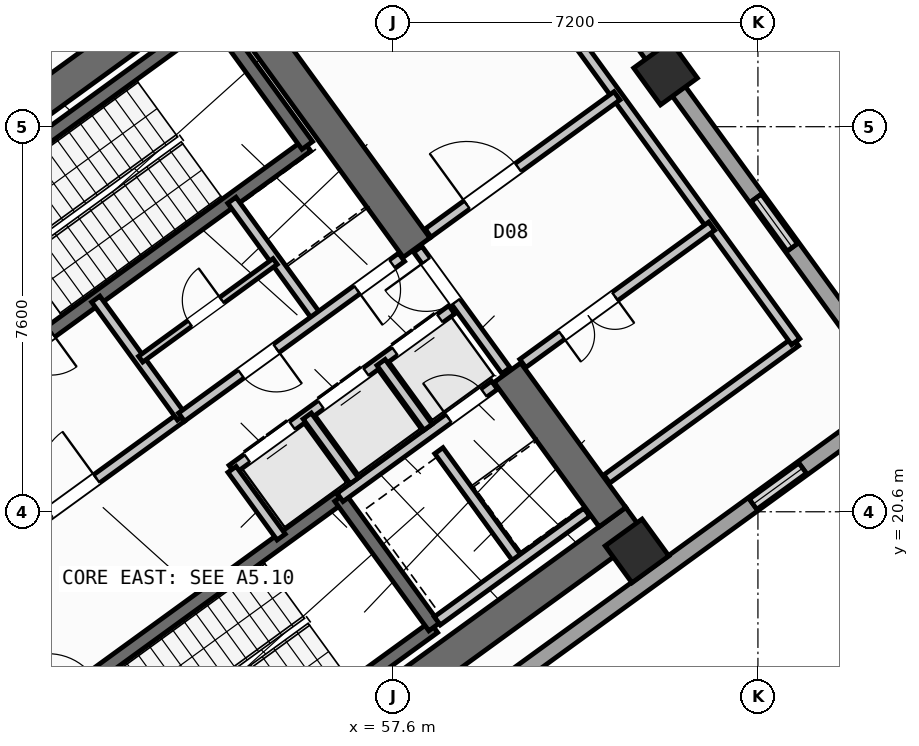
"""IFC4 building model, lengths in metres.
Left out: names, types, materials, properties, quantities, classifications, styles, units other than length and angle.
Written with IfcOpenShell. Run it as: python <this file> out.ifc"""

import sys

from ifc_helpers import new_model, si_unit, direction, frame, frame_2d, origin, origin_2d, place, context, subcontext, project, spatial, rectangle, hollow_rectangle, extrude, source, transform, mapped, element, fill, save


model = new_model("IFC4")
c1 = context("Model", 3, precision=1e-05, world=origin(), true_north=direction((0.0, 1.0)))
c2 = subcontext(c1, "Body", "Model", "MODEL_VIEW")
j1 = project(units=[si_unit("LENGTHUNIT", "METRE"), si_unit("PLANEANGLEUNIT", "RADIAN")], contexts=[c1])
p1 = place(None, origin())
s1 = spatial("IfcSite", under=j1, at=p1, CompositionType="ELEMENT")
p2 = place(p1, origin())
s2 = spatial("IfcBuilding", under=s1, at=p2, CompositionType="ELEMENT")
p3 = place(p2, frame((0.0, 0.0, 84.6)))
s3 = spatial("IfcBuildingStorey", under=s2, at=p3, CompositionType="ELEMENT", Elevation=84.6)
p4 = place(p3, frame((52.318, 13.11, 0.0), z_axis=(0.0, 0.0, 1.0), x_axis=(0.809019445368, 0.587781878776, 0.0)))
e1 = element("IfcWall", 1, at=p4, inside=s3, PredefinedType="SHEAR", context=c2, shape_type="SweptSolid", body=[
    extrude(rectangle(XDim=12.44, YDim=0.65, at=frame_2d((6.22, 0.0))), origin(), (0.0, 0.0, 1.0), 5.15),
])
p5 = place(p3, frame((44.325, 24.113, 0.0), z_axis=(0.0, 0.0, 1.0), x_axis=(0.809012664862, 0.58779121131, 0.0)))
e2 = element("IfcWall", 2, at=p5, inside=s3, PredefinedType="SHEAR", context=c2, shape_type="SweptSolid", body=[
    extrude(rectangle(XDim=12.44, YDim=0.65, at=frame_2d((6.22, 0.0))), origin(), (0.0, 0.0, 1.0), 5.15),
])
p6 = place(p3, frame((61.929, 20.494, 0.0), z_axis=(0.0, 0.0, 1.0), x_axis=(-0.58782982593, 0.808984607855, 0.0)))
e3 = element("IfcWall", 3, at=p6, inside=s3, PredefinedType="SHEAR", context=c2, shape_type="SweptSolid", body=[
    extrude(rectangle(XDim=3.525, YDim=0.65, at=frame_2d((1.762, 0.0))), origin(), (0.0, 0.0, 1.0), 5.15),
])
p7 = place(p3, frame((58.064, 25.813, 0.0), z_axis=(0.0, 0.0, 1.0), x_axis=(-0.58777996584, 0.809020835181, 0.0)))
e4 = element("IfcWall", 4, at=p7, inside=s3, PredefinedType="SHEAR", context=c2, shape_type="SweptSolid", body=[
    extrude(rectangle(XDim=6.375, YDim=0.65, at=frame_2d((3.188, 0.0))), origin(), (0.0, 0.0, 1.0), 5.15),
])
m1 = source(origin(), c2, "Body", "SweptSolid", [
    extrude(hollow_rectangle(XDim=0.9, YDim=0.9, WallThickness=0.036, at=origin_2d()), origin(), (0.0, 0.0, 1.0), 5.4),
])
for number, where, z_axis, x_axis in (
    (5, (62.414, 19.827, 0.0), (0.0, 0.0, 1.0), (0.809, 0.588, 0.0)),
    (6, (62.977, 29.259, 0.0), (0.0, 0.0, 1.0), (0.809, 0.588, 0.0)),
):
    element("IfcColumn", number, at=place(p3, frame(where, z_axis=z_axis, x_axis=x_axis)), inside=s3, PredefinedType="COLUMN", context=c2, shape_type="MappedRepresentation", body=[
        mapped(m1, transform((0.0, 0.0, 0.0), scale=1.0)),
    ])
p8 = place(p3, frame((54.81, 40.5, 0.0), z_axis=(0.0, 0.0, 1.0), x_axis=(0.587783625747, -0.809018176127, 0.0)))
e7 = element("IfcWall", 7, at=p8, inside=s3, PredefinedType="STANDARD", context=c2, shape_type="SweptSolid", body=[
    extrude(rectangle(XDim=21.587, YDim=0.32, at=frame_2d((10.794, 0.0))), origin(), (0.0, 0.0, 1.0), 4.575),
])
p9 = place(p8, frame((9.619, 0.0, 0.95)))
e8 = element("IfcOpeningElement", 8, at=p9, cuts=e7, PredefinedType="OPENING", context=c2, shape_type="SweptSolid", body=[
    extrude(rectangle(XDim=1.25, YDim=1.4, at=frame_2d((0.625, 0.7))), frame((0.0, 0.17, 0.0), z_axis=(0.0, -1.0, 0.0), x_axis=(1.0, 0.0, 0.0)), (0.0, 0.0, 1.0), 0.34),
])
p10 = place(p8, frame((16.919, 0.0, 0.95)))
e9 = element("IfcOpeningElement", 9, at=p10, cuts=e7, PredefinedType="OPENING", context=c2, shape_type="SweptSolid", body=[
    extrude(rectangle(XDim=1.25, YDim=1.4, at=frame_2d((0.625, 0.7))), frame((0.0, 0.17, 0.0), z_axis=(0.0, -1.0, 0.0), x_axis=(1.0, 0.0, 0.0)), (0.0, 0.0, 1.0), 0.34),
])
p11 = place(p3, frame((67.454, 22.747, 0.0), z_axis=(0.0, 0.0, 1.0), x_axis=(-0.809021120468, -0.587779573171, 0.0)))
e10 = element("IfcWall", 10, at=p11, inside=s3, PredefinedType="STANDARD", context=c2, shape_type="SweptSolid", body=[
    extrude(rectangle(XDim=17.588, YDim=0.32, at=frame_2d((8.794, 0.0))), origin(), (0.0, 0.0, 1.0), 5.15),
])
p12 = place(p11, frame((2.169, 0.0, 0.95)))
e11 = element("IfcOpeningElement", 11, at=p12, cuts=e10, PredefinedType="OPENING", context=c2, shape_type="SweptSolid", body=[
    extrude(rectangle(XDim=1.25, YDim=1.4, at=frame_2d((0.625, 0.7))), frame((0.0, 0.17, 0.0), z_axis=(0.0, -1.0, 0.0), x_axis=(1.0, 0.0, 0.0)), (0.0, 0.0, 1.0), 0.34),
])
p13 = place(p11, frame((11.169, 0.0, 0.95)))
e12 = element("IfcOpeningElement", 12, at=p13, cuts=e10, PredefinedType="OPENING", context=c2, shape_type="SweptSolid", body=[
    extrude(rectangle(XDim=1.25, YDim=1.4, at=frame_2d((0.625, 0.7))), frame((0.0, 0.17, 0.0), z_axis=(0.0, -1.0, 0.0), x_axis=(1.0, 0.0, 0.0)), (0.0, 0.0, 1.0), 0.34),
])
p14 = place(p3, frame((48.006, 25.996, 0.0), z_axis=(0.0, 0.0, 1.0), x_axis=(0.80901903764, 0.587782439969, 0.0)))
e13 = element("IfcWall", 13, at=p14, inside=s3, PredefinedType="SHEAR", context=c2, shape_type="SweptSolid", body=[
    extrude(rectangle(XDim=7.46, YDim=0.26, at=frame_2d((3.73, 0.0))), origin(), (0.0, 0.0, 1.0), 5.15),
])
p15 = place(p3, frame((49.863, 23.44, 0.0), z_axis=(0.0, 0.0, 1.0), x_axis=(0.809003474932, 0.587803859759, 0.0)))
e14 = element("IfcWall", 14, at=p15, inside=s3, PredefinedType="SHEAR", context=c2, shape_type="SweptSolid", body=[
    extrude(rectangle(XDim=7.46, YDim=0.26, at=frame_2d((3.73, 0.0))), origin(), (0.0, 0.0, 1.0), 5.15),
])
p16 = place(p15, frame((0.36, 0.0, 0.0)))
e15 = element("IfcOpeningElement", 15, at=p16, cuts=e14, PredefinedType="OPENING", context=c2, shape_type="SweptSolid", body=[
    extrude(rectangle(XDim=0.86, YDim=2.05, at=frame_2d((0.43, 1.025))), frame((0.0, 0.14, 0.0), z_axis=(0.0, -1.0, 0.0), x_axis=(1.0, 0.0, 0.0)), (0.0, 0.0, 1.0), 0.28),
])
p17 = place(p3, frame((55.906, 27.831, 0.0), z_axis=(0.0, 0.0, 1.0), x_axis=(-0.587804123638, 0.809003283204, 0.0)))
e16 = element("IfcWall", 16, at=p17, inside=s3, PredefinedType="SHEAR", context=c2, shape_type="SweptSolid", body=[
    extrude(rectangle(XDim=3.16, YDim=0.26, at=frame_2d((1.58, 0.0))), origin(), (0.0, 0.0, 1.0), 5.15),
])
p18 = place(p3, frame((52.472, 14.013, 0.0), z_axis=(0.0, 0.0, 1.0), x_axis=(0.809028366311, 0.587769599847, 0.0)))
e17 = element("IfcWall", 17, at=p18, inside=s3, PredefinedType="SHEAR", context=c2, shape_type="SweptSolid", body=[
    extrude(rectangle(XDim=7.33, YDim=0.26, at=frame_2d((3.665, 0.0))), origin(), (0.0, 0.0, 1.0), 5.15),
])
p19 = place(p3, frame((50.615, 16.57, 0.0), z_axis=(0.0, 0.0, 1.0), x_axis=(0.809028366311, 0.587769599847, 0.0)))
e18 = element("IfcWall", 18, at=p19, inside=s3, PredefinedType="SHEAR", context=c2, shape_type="SweptSolid", body=[
    extrude(rectangle(XDim=7.33, YDim=0.26, at=frame_2d((3.665, 0.0))), origin(), (0.0, 0.0, 1.0), 5.15),
])
p20 = place(p19, frame((0.22, 0.0, 0.0)))
e19 = element("IfcOpeningElement", 19, at=p20, cuts=e18, PredefinedType="OPENING", context=c2, shape_type="SweptSolid", body=[
    extrude(rectangle(XDim=1.1, YDim=2.1, at=frame_2d((0.55, 1.05))), frame((0.0, 0.14, 0.0), z_axis=(0.0, -1.0, 0.0), x_axis=(1.0, 0.0, 0.0)), (0.0, 0.0, 1.0), 0.28),
])
p21 = place(p3, frame((58.41, 18.327, 0.0), z_axis=(0.0, 0.0, 1.0), x_axis=(-0.58776738483, 0.809029975545, 0.0)))
e20 = element("IfcWall", 20, at=p21, inside=s3, PredefinedType="SHEAR", context=c2, shape_type="SweptSolid", body=[
    extrude(rectangle(XDim=3.16, YDim=0.26, at=frame_2d((1.58, 0.0))), origin(), (0.0, 0.0, 1.0), 5.15),
])
p22 = place(p3, frame((48.799, 19.107, 0.0), z_axis=(0.0, 0.0, 1.0), x_axis=(0.809012959416, 0.587790805897, 0.0)))
e21 = element("IfcWall", 21, at=p22, inside=s3, PredefinedType="STANDARD", context=c2, shape_type="SweptSolid", body=[
    extrude(rectangle(XDim=5.718, YDim=0.2, at=frame_2d((2.859, 0.0))), origin(), (0.0, 0.0, 1.0), 5.14),
])
p23 = place(p22, frame((2.498, 0.0, 0.0)))
e22 = element("IfcOpeningElement", 22, at=p23, cuts=e21, PredefinedType="OPENING", context=c2, shape_type="SweptSolid", body=[
    extrude(rectangle(XDim=1.15, YDim=2.1, at=frame_2d((0.575, 1.05))), frame((0.0, 0.11, 0.0), z_axis=(0.0, -1.0, 0.0), x_axis=(1.0, 0.0, 0.0)), (0.0, 0.0, 1.0), 0.22),
])
p24 = place(p3, frame((56.553, 20.884, 0.0), z_axis=(0.0, 0.0, 1.0), x_axis=(0.809035789462, 0.587759382205, 0.0)))
e23 = element("IfcWall", 23, at=p24, inside=s3, PredefinedType="STANDARD", context=c2, shape_type="SweptSolid", body=[
    extrude(rectangle(XDim=3.768, YDim=0.2, at=frame_2d((1.884, 0.0))), origin(), (0.0, 0.0, 1.0), 5.14),
])
p25 = place(p24, frame((2.65, 0.0, 0.0)))
e24 = element("IfcOpeningElement", 24, at=p25, cuts=e23, PredefinedType="OPENING", context=c2, shape_type="SweptSolid", body=[
    extrude(rectangle(XDim=0.86, YDim=2.05, at=frame_2d((0.43, 1.025))), frame((0.0, 0.11, 0.0), z_axis=(0.0, -1.0, 0.0), x_axis=(1.0, 0.0, 0.0)), (0.0, 0.0, 1.0), 0.22),
])
p26 = place(p3, frame((54.421, 21.436, 0.0), z_axis=(0.0, 0.0, 1.0), x_axis=(0.809013710463, 0.587789772183, 0.0)))
e25 = element("IfcWall", 25, at=p26, inside=s3, PredefinedType="STANDARD", context=c2, shape_type="SweptSolid", body=[
    extrude(rectangle(XDim=5.36, YDim=0.2, at=frame_2d((2.68, 0.0))), origin(), (0.0, 0.0, 1.0), 5.14),
])
p27 = place(p26, frame((0.37, 0.0, 0.0)))
e26 = element("IfcOpeningElement", 26, at=p27, cuts=e25, PredefinedType="OPENING", context=c2, shape_type="SweptSolid", body=[
    extrude(rectangle(XDim=1.1, YDim=2.15, at=frame_2d((0.55, 1.075))), frame((0.0, 0.11, 0.0), z_axis=(0.0, -1.0, 0.0), x_axis=(1.0, 0.0, 0.0)), (0.0, 0.0, 1.0), 0.22),
])
p28 = place(p26, frame((2.17, 0.0, 0.0)))
e27 = element("IfcOpeningElement", 27, at=p28, cuts=e25, PredefinedType="OPENING", context=c2, shape_type="SweptSolid", body=[
    extrude(rectangle(XDim=1.1, YDim=2.15, at=frame_2d((0.55, 1.075))), frame((0.0, 0.11, 0.0), z_axis=(0.0, -1.0, 0.0), x_axis=(1.0, 0.0, 0.0)), (0.0, 0.0, 1.0), 0.22),
])
p29 = place(p26, frame((3.97, 0.0, 0.0)))
e28 = element("IfcOpeningElement", 28, at=p29, cuts=e25, PredefinedType="OPENING", context=c2, shape_type="SweptSolid", body=[
    extrude(rectangle(XDim=1.1, YDim=2.15, at=frame_2d((0.55, 1.075))), frame((0.0, 0.11, 0.0), z_axis=(0.0, -1.0, 0.0), x_axis=(1.0, 0.0, 0.0)), (0.0, 0.0, 1.0), 0.22),
])
p30 = place(p3, frame((55.391, 20.102, 0.0), z_axis=(0.0, 0.0, 1.0), x_axis=(-0.58778447739, 0.809017557374, 0.0)))
e29 = element("IfcWall", 29, at=p30, inside=s3, PredefinedType="STANDARD", context=c2, shape_type="SweptSolid", body=[
    extrude(rectangle(XDim=1.65, YDim=0.2, at=frame_2d((0.825, 0.0))), origin(), (0.0, 0.0, 1.0), 5.14),
])
p31 = place(p3, frame((56.834, 21.212, 0.0), z_axis=(0.0, 0.0, 1.0), x_axis=(-0.58776738483, 0.809029975545, 0.0)))
e30 = element("IfcWall", 30, at=p31, inside=s3, PredefinedType="STANDARD", context=c2, shape_type="SweptSolid", body=[
    extrude(rectangle(XDim=1.58, YDim=0.2, at=frame_2d((0.79, 0.0))), origin(), (0.0, 0.0, 1.0), 5.14),
])
p32 = place(p3, frame((58.29, 22.27, 0.0), z_axis=(0.0, 0.0, 1.0), x_axis=(-0.587840865826, 0.808976585857, 0.0)))
e31 = element("IfcWall", 31, at=p32, inside=s3, PredefinedType="STANDARD", context=c2, shape_type="SweptSolid", body=[
    extrude(rectangle(XDim=1.58, YDim=0.2, at=frame_2d((0.79, 0.0))), origin(), (0.0, 0.0, 1.0), 5.14),
])
p33 = place(p3, frame((60.067, 19.655, 0.0), z_axis=(0.0, 0.0, 1.0), x_axis=(-0.587800520745, 0.809005900975, 0.0)))
e32 = element("IfcWall", 32, at=p33, inside=s3, PredefinedType="STANDARD", context=c2, shape_type="SweptSolid", body=[
    extrude(rectangle(XDim=2.66, YDim=0.2, at=frame_2d((1.33, 0.0))), origin(), (0.0, 0.0, 1.0), 5.14),
])
p34 = place(p3, frame((58.472, 18.447, 0.0), z_axis=(0.0, 0.0, 1.0), x_axis=(0.809022487728, 0.587777691266, 0.0)))
e33 = element("IfcWall", 33, at=p34, inside=s3, PredefinedType="STANDARD", context=c2, shape_type="SweptSolid", body=[
    extrude(rectangle(XDim=3.648, YDim=0.2, at=frame_2d((1.824, 0.0))), origin(), (0.0, 0.0, 1.0), 5.14),
])
p35 = place(p3, frame((53.425, 22.468, 0.0), z_axis=(0.0, 0.0, 1.0), x_axis=(-0.5877230039, 0.809062216821, 0.0)))
e34 = element("IfcWall", 34, at=p35, inside=s3, PredefinedType="STANDARD", context=c2, shape_type="SweptSolid", body=[
    extrude(rectangle(XDim=2.88, YDim=0.2, at=frame_2d((1.44, 0.0))), origin(), (0.0, 0.0, 1.0), 5.14),
])
p36 = place(p3, frame((56.111, 24.419, 0.0), z_axis=(0.0, 0.0, 1.0), x_axis=(-0.58777848983, 0.809021907548, 0.0)))
e35 = element("IfcWall", 35, at=p36, inside=s3, PredefinedType="STANDARD", context=c2, shape_type="SweptSolid", body=[
    extrude(rectangle(XDim=2.88, YDim=0.2, at=frame_2d((1.44, 0.0))), origin(), (0.0, 0.0, 1.0), 5.14),
])
p37 = place(p3, frame((53.425, 22.468, 0.0), z_axis=(0.0, 0.0, 1.0), x_axis=(0.80902705128, 0.587771409902, 0.0)))
e36 = element("IfcWall", 36, at=p37, inside=s3, PredefinedType="STANDARD", context=c2, shape_type="SweptSolid", body=[
    extrude(rectangle(XDim=5.368, YDim=0.2, at=frame_2d((2.684, 0.0))), origin(), (0.0, 0.0, 1.0), 5.14),
])
p38 = place(p37, frame((4.28, 0.0, 0.0)))
e37 = element("IfcOpeningElement", 37, at=p38, cuts=e36, PredefinedType="OPENING", context=c2, shape_type="SweptSolid", body=[
    extrude(rectangle(XDim=0.86, YDim=2.05, at=frame_2d((0.43, 1.025))), frame((0.0, 0.11, 0.0), z_axis=(0.0, -1.0, 0.0), x_axis=(1.0, 0.0, 0.0)), (0.0, 0.0, 1.0), 0.22),
])
p39 = place(p37, frame((1.45, 0.0, 0.0)))
e38 = element("IfcOpeningElement", 38, at=p39, cuts=e36, PredefinedType="OPENING", context=c2, shape_type="SweptSolid", body=[
    extrude(rectangle(XDim=0.86, YDim=2.05, at=frame_2d((0.43, 1.025))), frame((0.0, 0.11, 0.0), z_axis=(0.0, -1.0, 0.0), x_axis=(1.0, 0.0, 0.0)), (0.0, 0.0, 1.0), 0.22),
])
p40 = place(p3, frame((52.618, 23.612, 0.0), z_axis=(0.0, 0.0, 1.0), x_axis=(0.809009587469, 0.587795446889, 0.0)))
e39 = element("IfcWall", 39, at=p40, inside=s3, PredefinedType="PLUMBINGWALL", context=c2, shape_type="SweptSolid", body=[
    extrude(rectangle(XDim=3.28, YDim=0.14, at=frame_2d((1.64, 0.0))), origin(), (0.0, 0.0, 1.0), 5.14),
])
p41 = place(p40, frame((1.2, 0.0, 0.0)))
e40 = element("IfcOpeningElement", 40, at=p41, cuts=e39, PredefinedType="OPENING", context=c2, shape_type="SweptSolid", body=[
    extrude(rectangle(XDim=0.78, YDim=2.05, at=frame_2d((0.39, 1.025))), frame((0.0, 0.08, 0.0), z_axis=(0.0, -1.0, 0.0), x_axis=(1.0, 0.0, 0.0)), (0.0, 0.0, 1.0), 0.16),
])
p42 = place(p3, frame((59.827, 23.386, 0.0), z_axis=(0.0, 0.0, 1.0), x_axis=(-0.587803840107, 0.809003489211, 0.0)))
e41 = element("IfcWall", 41, at=p42, inside=s3, PredefinedType="STANDARD", context=c2, shape_type="SweptSolid", body=[
    extrude(rectangle(XDim=2.96, YDim=0.2, at=frame_2d((1.48, 0.0))), origin(), (0.0, 0.0, 1.0), 5.14),
])
p43 = place(p42, frame((1.68, 0.0, 0.0)))
e42 = element("IfcOpeningElement", 42, at=p43, cuts=e41, PredefinedType="OPENING", context=c2, shape_type="SweptSolid", body=[
    extrude(rectangle(XDim=1.0, YDim=2.1, at=frame_2d((0.5, 1.05))), frame((0.0, 0.11, 0.0), z_axis=(0.0, -1.0, 0.0), x_axis=(1.0, 0.0, 0.0)), (0.0, 0.0, 1.0), 0.22),
])
p44 = place(p3, frame((61.817, 21.247, 0.0), z_axis=(0.0, 0.0, 1.0), x_axis=(0.80902466346, 0.587774696557, 0.0)))
e43 = element("IfcWall", 43, at=p44, inside=s3, PredefinedType="STANDARD", context=c2, shape_type="SweptSolid", body=[
    extrude(rectangle(XDim=4.608, YDim=0.2, at=frame_2d((2.304, 0.0))), origin(), (0.0, 0.0, 1.0), 5.14),
])
p45 = place(p3, frame((65.545, 23.956, 0.0), z_axis=(0.0, 0.0, 1.0), x_axis=(-0.587791199948, 0.809012673117, 0.0)))
e44 = element("IfcWall", 44, at=p45, inside=s3, PredefinedType="STANDARD", context=c2, shape_type="SweptSolid", body=[
    extrude(rectangle(XDim=11.6, YDim=0.2, at=frame_2d((5.8, 0.0))), origin(), (0.0, 0.0, 1.0), 5.14),
])
p46 = place(p3, frame((58.29, 26.101, 0.0), z_axis=(0.0, 0.0, 1.0), x_axis=(0.80902466346, 0.587774696557, 0.0)))
e45 = element("IfcWall", 45, at=p46, inside=s3, PredefinedType="STANDARD", context=c2, shape_type="SweptSolid", body=[
    extrude(rectangle(XDim=4.608, YDim=0.2, at=frame_2d((2.304, 0.0))), origin(), (0.0, 0.0, 1.0), 4.575),
])
p47 = place(p46, frame((0.948, 0.0, 0.0)))
e46 = element("IfcOpeningElement", 46, at=p47, cuts=e45, PredefinedType="OPENING", context=c2, shape_type="SweptSolid", body=[
    extrude(rectangle(XDim=1.25, YDim=2.15, at=frame_2d((0.625, 1.075))), frame((0.0, 0.11, 0.0), z_axis=(0.0, -1.0, 0.0), x_axis=(1.0, 0.0, 0.0)), (0.0, 0.0, 1.0), 0.22),
])
p48 = place(p3, frame((60.159, 23.529, 0.0), z_axis=(0.0, 0.0, 1.0), x_axis=(0.808999469603, 0.587809372315, 0.0)))
e47 = element("IfcWall", 47, at=p48, inside=s3, PredefinedType="STANDARD", context=c2, shape_type="SweptSolid", body=[
    extrude(rectangle(XDim=4.608, YDim=0.2, at=frame_2d((2.304, 0.0))), origin(), (0.0, 0.0, 1.0), 5.14),
])
p49 = place(p48, frame((0.948, 0.0, 0.0)))
e48 = element("IfcOpeningElement", 48, at=p49, cuts=e47, PredefinedType="OPENING", context=c2, shape_type="SweptSolid", body=[
    extrude(rectangle(XDim=1.3, YDim=2.15, at=frame_2d((0.65, 1.075))), frame((0.0, 0.11, 0.0), z_axis=(0.0, -1.0, 0.0), x_axis=(1.0, 0.0, 0.0)), (0.0, 0.0, 1.0), 0.22),
])
m2 = source(origin(), c2, "Body", "SweptSolid", [
    extrude(rectangle(XDim=1.25, YDim=1.4, at=frame_2d((0.625, 0.7))), frame((0.0, 0.03, 0.0), z_axis=(0.0, -1.0, 0.0), x_axis=(1.0, 0.0, 0.0)), (0.0, 0.0, 1.0), 0.06),
])
p50 = place(p10, origin())
e49 = element("IfcWindow", 49, at=p50, inside=s3, PartitioningType="SINGLE_PANEL", PredefinedType="WINDOW", context=c2, shape_type="MappedRepresentation", body=[
    mapped(m2, transform((0.0, 0.0, 0.0), scale=1.0)),
])
fill(e9, e49)
p51 = place(p12, origin())
e50 = element("IfcWindow", 50, at=p51, inside=s3, PartitioningType="SINGLE_PANEL", PredefinedType="WINDOW", context=c2, shape_type="MappedRepresentation", body=[
    mapped(m2, transform((0.0, 0.0, 0.0), scale=1.0)),
])
fill(e11, e50)
m3 = source(origin(), c2, "Body", "SweptSolid", [
    extrude(rectangle(XDim=1.15, YDim=2.1, at=frame_2d((0.575, 1.05))), frame((0.0, 0.025, 0.0), z_axis=(0.0, -1.0, 0.0), x_axis=(1.0, 0.0, 0.0)), (0.0, 0.0, 1.0), 0.05),
])
p52 = place(p23, origin())
e51 = element("IfcDoor", 51, at=p52, inside=s3, OperationType="SINGLE_SWING_RIGHT", PredefinedType="DOOR", context=c2, shape_type="MappedRepresentation", body=[
    mapped(m3, transform((0.0, 0.0, 0.0), scale=1.0)),
])
fill(e22, e51)
m4 = source(origin(), c2, "Body", "SweptSolid", [
    extrude(rectangle(XDim=1.1, YDim=2.15, at=frame_2d((0.55, 1.075))), frame((0.0, 0.025, 0.0), z_axis=(0.0, -1.0, 0.0), x_axis=(1.0, 0.0, 0.0)), (0.0, 0.0, 1.0), 0.05),
])
p53 = place(p27, origin())
e52 = element("IfcDoor", 52, at=p53, inside=s3, OperationType="DOUBLE_DOOR_SLIDING", PredefinedType="DOOR", context=c2, shape_type="MappedRepresentation", body=[
    mapped(m4, transform((0.0, 0.0, 0.0), scale=1.0)),
])
fill(e26, e52)
p54 = place(p28, origin())
e53 = element("IfcDoor", 53, at=p54, inside=s3, OperationType="DOUBLE_DOOR_SLIDING", PredefinedType="DOOR", context=c2, shape_type="MappedRepresentation", body=[
    mapped(m4, transform((0.0, 0.0, 0.0), scale=1.0)),
])
fill(e27, e53)
p55 = place(p29, origin())
e54 = element("IfcDoor", 54, at=p55, inside=s3, OperationType="DOUBLE_DOOR_SLIDING", PredefinedType="DOOR", context=c2, shape_type="MappedRepresentation", body=[
    mapped(m4, transform((0.0, 0.0, 0.0), scale=1.0)),
])
fill(e28, e54)
m5 = source(origin(), c2, "Body", "SweptSolid", [
    extrude(rectangle(XDim=0.86, YDim=2.05, at=frame_2d((0.43, 1.025))), frame((0.0, 0.025, 0.0), z_axis=(0.0, -1.0, 0.0), x_axis=(1.0, 0.0, 0.0)), (0.0, 0.0, 1.0), 0.05),
])
p56 = place(p25, origin())
e55 = element("IfcDoor", 55, at=p56, inside=s3, OperationType="SINGLE_SWING_LEFT", PredefinedType="DOOR", context=c2, shape_type="MappedRepresentation", body=[
    mapped(m5, transform((0.0, 0.0, 0.0), scale=1.0)),
])
fill(e24, e55)
p57 = place(p38, frame((0.86, 0.0, 0.0), z_axis=(0.0, 0.0, 1.0), x_axis=(-1.0, 0.0, 0.0)))
e56 = element("IfcDoor", 56, at=p57, inside=s3, OperationType="SINGLE_SWING_RIGHT", PredefinedType="DOOR", context=c2, shape_type="MappedRepresentation", body=[
    mapped(m5, transform((0.0, 0.0, 0.0), scale=1.0)),
])
fill(e37, e56)
p58 = place(p39, frame((0.86, 0.0, 0.0), z_axis=(0.0, 0.0, 1.0), x_axis=(-1.0, 0.0, 0.0)))
e57 = element("IfcDoor", 57, at=p58, inside=s3, OperationType="SINGLE_SWING_LEFT", PredefinedType="DOOR", context=c2, shape_type="MappedRepresentation", body=[
    mapped(m5, transform((0.0, 0.0, 0.0), scale=1.0)),
])
fill(e38, e57)
m6 = source(origin(), c2, "Body", "SweptSolid", [
    extrude(rectangle(XDim=0.78, YDim=2.05, at=frame_2d((0.39, 1.025))), frame((0.0, 0.025, 0.0), z_axis=(0.0, -1.0, 0.0), x_axis=(1.0, 0.0, 0.0)), (0.0, 0.0, 1.0), 0.05),
])
p59 = place(p41, origin())
e58 = element("IfcDoor", 58, at=p59, inside=s3, OperationType="SINGLE_SWING_RIGHT", PredefinedType="DOOR", context=c2, shape_type="MappedRepresentation", body=[
    mapped(m6, transform((0.0, 0.0, 0.0), scale=1.0)),
])
fill(e40, e58)
m7 = source(origin(), c2, "Body", "SweptSolid", [
    extrude(rectangle(XDim=1.0, YDim=2.1, at=frame_2d((0.5, 1.05))), frame((0.0, 0.025, 0.0), z_axis=(0.0, -1.0, 0.0), x_axis=(1.0, 0.0, 0.0)), (0.0, 0.0, 1.0), 0.05),
])
p60 = place(p43, origin())
e59 = element("IfcDoor", 59, at=p60, inside=s3, OperationType="SINGLE_SWING_RIGHT", PredefinedType="DOOR", context=c2, shape_type="MappedRepresentation", body=[
    mapped(m7, transform((0.0, 0.0, 0.0), scale=1.0)),
])
fill(e42, e59)
m8 = source(origin(), c2, "Body", "SweptSolid", [
    extrude(rectangle(XDim=1.25, YDim=2.15, at=frame_2d((0.625, 1.075))), frame((0.0, 0.025, 0.0), z_axis=(0.0, -1.0, 0.0), x_axis=(1.0, 0.0, 0.0)), (0.0, 0.0, 1.0), 0.05),
])
p61 = place(p47, origin())
e60 = element("IfcDoor", 60, at=p61, inside=s3, OperationType="SINGLE_SWING_LEFT", PredefinedType="DOOR", context=c2, shape_type="MappedRepresentation", body=[
    mapped(m8, transform((0.0, 0.0, 0.0), scale=1.0)),
])
fill(e46, e60)
m9 = source(origin(), c2, "Body", "SweptSolid", [
    extrude(rectangle(XDim=1.3, YDim=2.15, at=frame_2d((0.65, 1.075))), frame((0.0, 0.025, 0.0), z_axis=(0.0, -1.0, 0.0), x_axis=(1.0, 0.0, 0.0)), (0.0, 0.0, 1.0), 0.05),
])
p62 = place(p49, frame((1.3, 0.0, 0.0), z_axis=(0.0, 0.0, 1.0), x_axis=(-1.0, 0.0, 0.0)))
e61 = element("IfcDoor", 61, at=p62, inside=s3, OperationType="DOUBLE_DOOR_SINGLE_SWING", PredefinedType="DOOR", context=c2, shape_type="MappedRepresentation", body=[
    mapped(m9, transform((0.0, 0.0, 0.0), scale=1.0)),
])
fill(e48, e61)
save(model, sys.argv[1])
